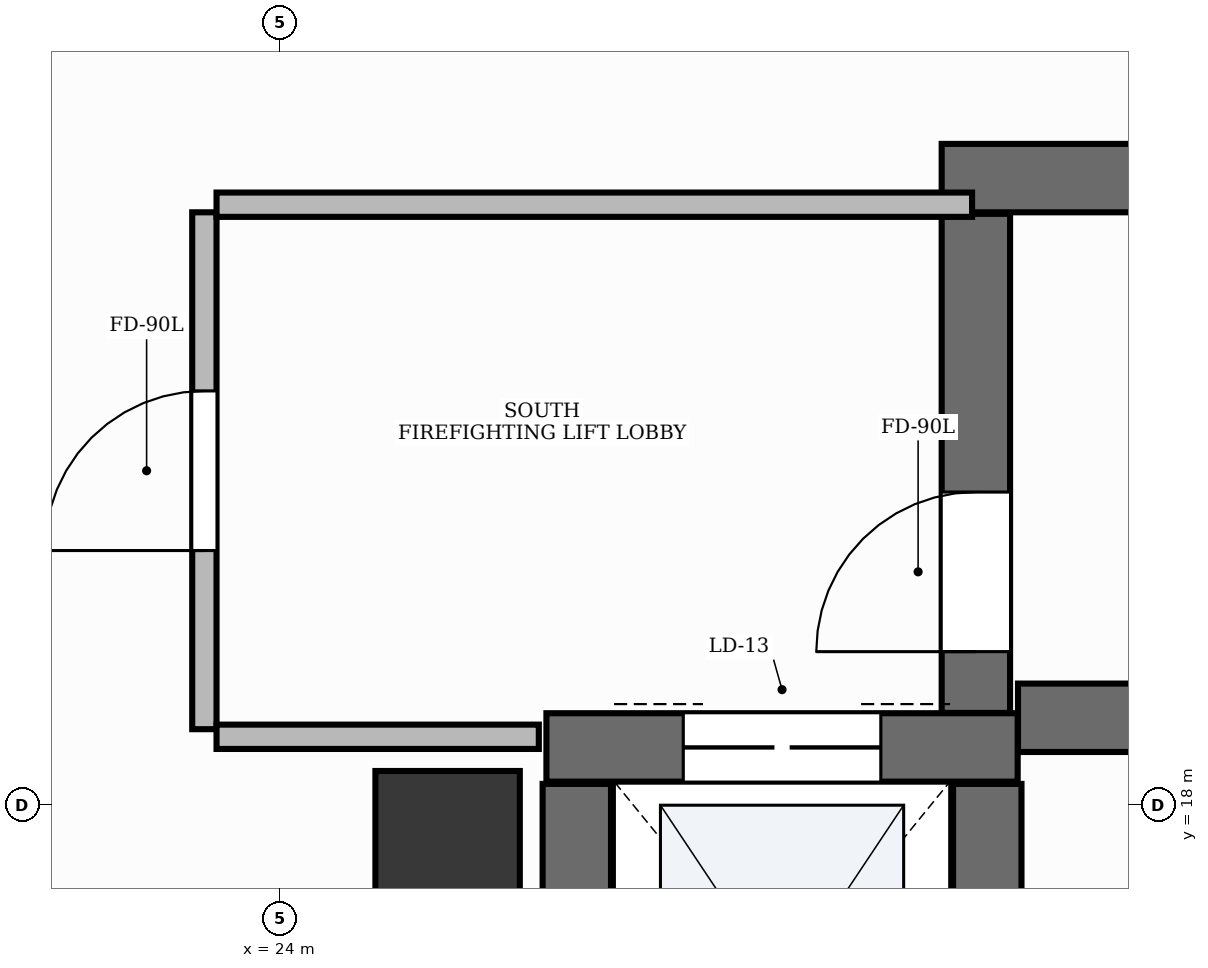
"""IFC4 building model, lengths in metres.
Left out: names, types, materials, properties, quantities, classifications, styles, units other than length and angle.
Written with IfcOpenShell. Run it as: python <this file> out.ifc"""

import sys

from ifc_helpers import new_model, si_unit, direction, frame, frame_2d, origin, origin_2d, place, context, subcontext, project, spatial, rectangle, extrude, element, fill, save


model = new_model("IFC4")
c1 = context("Model", 3, precision=1e-05, world=origin(), true_north=direction((0.0, 1.0)))
c2 = subcontext(c1, "Body", "Model", "MODEL_VIEW")
j1 = project(units=[si_unit("LENGTHUNIT", "METRE"), si_unit("PLANEANGLEUNIT", "RADIAN")], contexts=[c1])
p1 = place(None, origin())
s1 = spatial("IfcSite", under=j1, at=p1, CompositionType="ELEMENT")
p2 = place(p1, origin())
s2 = spatial("IfcBuilding", under=s1, at=p2, CompositionType="ELEMENT")
p3 = place(p2, frame((0.0, 0.0, 90.0)))
s3 = spatial("IfcBuildingStorey", under=s2, at=p3, CompositionType="ELEMENT", Elevation=90.0)
p4 = place(p3, frame((28.852, 18.575, 0.0), z_axis=(0.0, 0.0, 1.0), x_axis=(1.0, 0.0, 0.0)))
e1 = element("IfcWall", 1, at=p4, inside=s3, PredefinedType="SHEAR", context=c2, shape_type="SweptSolid", body=[
    extrude(rectangle(XDim=8.248, YDim=0.45, at=frame_2d((4.124, 0.0))), origin(), (0.0, 0.0, 1.0), 3.9),
])
p5 = place(p3, frame((28.35, 22.125, 0.0), z_axis=(0.0, 0.0, 1.0), x_axis=(1.0, 0.0, 0.0)))
e2 = element("IfcWall", 2, at=p5, inside=s3, PredefinedType="SHEAR", context=c2, shape_type="SweptSolid", body=[
    extrude(rectangle(XDim=8.75, YDim=0.45, at=frame_2d((4.375, 0.0))), origin(), (0.0, 0.0, 1.0), 3.9),
])
p6 = place(p3, frame((28.575, 18.607, 0.0), z_axis=(0.0, 0.0, 1.0), x_axis=(0.0, 1.0, 0.0)))
e3 = element("IfcWall", 3, at=p6, inside=s3, PredefinedType="SHEAR", context=c2, shape_type="SweptSolid", body=[
    extrude(rectangle(XDim=3.283, YDim=0.45, at=frame_2d((1.642, 0.0))), origin(), (0.0, 0.0, 1.0), 3.9),
])
p7 = place(p6, frame((0.403, 0.0, 0.0)))
e4 = element("IfcOpeningElement", 4, at=p7, cuts=e3, PredefinedType="OPENING", context=c2, shape_type="SweptSolid", body=[
    extrude(rectangle(XDim=1.05, YDim=2.15, at=frame_2d((0.525, 1.075))), frame((0.0, 0.24, 0.0), z_axis=(0.0, -1.0, 0.0), x_axis=(1.0, 0.0, 0.0)), (0.0, 0.0, 1.0), 0.48),
])
p8 = place(p3, frame((25.75, 18.38, 0.0), z_axis=(0.0, 0.0, 1.0), x_axis=(1.0, 0.0, 0.0)))
e5 = element("IfcWall", 5, at=p8, inside=s3, PredefinedType="SHEAR", context=c2, shape_type="SweptSolid", body=[
    extrude(rectangle(XDim=3.1, YDim=0.45, at=frame_2d((1.55, 0.0))), origin(), (0.0, 0.0, 1.0), 3.9),
])
p9 = place(p8, frame((0.9, 0.0, 0.0)))
e6 = element("IfcOpeningElement", 6, at=p9, cuts=e5, PredefinedType="OPENING", context=c2, shape_type="SweptSolid", body=[
    extrude(rectangle(XDim=1.3, YDim=2.2, at=frame_2d((0.65, 1.1))), frame((0.0, 0.24, 0.0), z_axis=(0.0, -1.0, 0.0), x_axis=(1.0, 0.0, 0.0)), (0.0, 0.0, 1.0), 0.48),
])
for number, where, z_axis, x_axis in (
    (7, (25.95, 15.44, 0.0), (0.0, 0.0, 1.0), (0.0, 1.0, 0.0)),
    (8, (28.65, 15.44, 0.0), (0.0, 0.0, 1.0), (0.0, 1.0, 0.0)),
):
    element("IfcWall", number, at=place(p3, frame(where, z_axis=z_axis, x_axis=x_axis)), inside=s3, PredefinedType="SHEAR", context=c2, shape_type="SweptSolid", body=[
        extrude(rectangle(XDim=2.7, YDim=0.45, at=frame_2d((1.35, 0.0))), origin(), (0.0, 0.0, 1.0), 3.9),
    ])
p10 = place(p3, frame((25.1, 17.75, -0.0), z_axis=(0.0, 0.0, 1.0), x_axis=(1.0, 0.0, 0.0)))
e9 = element("IfcColumn", 9, at=p10, inside=s3, PredefinedType="PILASTER", context=c2, shape_type="SweptSolid", body=[
    extrude(rectangle(XDim=0.95, YDim=0.95, at=origin_2d()), origin(), (0.0, 0.0, 1.0), 3.901),
])
p11 = place(p3, frame((23.5, 18.5, 0.0), z_axis=(0.0, 0.0, 1.0), x_axis=(0.0, 1.0, 0.0)))
e10 = element("IfcWall", 10, at=p11, inside=s3, PredefinedType="PARTITIONING", context=c2, shape_type="SweptSolid", body=[
    extrude(rectangle(XDim=3.4, YDim=0.16, at=frame_2d((1.7, 0.0))), origin(), (0.0, 0.0, 1.0), 2.91),
])
p12 = place(p11, frame((1.175, 0.0, 0.0)))
e11 = element("IfcOpeningElement", 11, at=p12, cuts=e10, PredefinedType="OPENING", context=c2, shape_type="SweptSolid", body=[
    extrude(rectangle(XDim=1.05, YDim=2.15, at=frame_2d((0.525, 1.075))), frame((0.0, 0.095, 0.0), z_axis=(0.0, -1.0, 0.0), x_axis=(1.0, 0.0, 0.0)), (0.0, 0.0, 1.0), 0.19),
])
p13 = place(p3, frame((23.58, 21.95, 0.0), z_axis=(0.0, 0.0, 1.0), x_axis=(1.0, 0.0, 0.0)))
e12 = element("IfcWall", 12, at=p13, inside=s3, PredefinedType="PARTITIONING", context=c2, shape_type="SweptSolid", body=[
    extrude(rectangle(XDim=4.97, YDim=0.16, at=frame_2d((2.485, 0.0))), origin(), (0.0, 0.0, 1.0), 2.91),
])
p14 = place(p3, frame((23.58, 18.45, 0.0), z_axis=(0.0, 0.0, 1.0), x_axis=(1.0, 0.0, 0.0)))
e13 = element("IfcWall", 13, at=p14, inside=s3, PredefinedType="PARTITIONING", context=c2, shape_type="SweptSolid", body=[
    extrude(rectangle(XDim=2.12, YDim=0.16, at=frame_2d((1.06, 0.0))), origin(), (0.0, 0.0, 1.0), 2.91),
])
p15 = place(p7, origin())
e14 = element("IfcDoor", 14, at=p15, inside=s3, OperationType="SINGLE_SWING_LEFT", PredefinedType="DOOR", context=c2, shape_type="SweptSolid", body=[
    extrude(rectangle(XDim=1.05, YDim=2.15, at=frame_2d((0.525, 1.075))), frame((0.0, 0.025, 0.0), z_axis=(0.0, -1.0, 0.0), x_axis=(1.0, 0.0, 0.0)), (0.0, 0.0, 1.0), 0.05),
])
fill(e4, e14)
p16 = place(p9, origin())
e15 = element("IfcDoor", 15, at=p16, inside=s3, OperationType="DOUBLE_DOOR_SLIDING", PredefinedType="DOOR", context=c2, shape_type="SweptSolid", body=[
    extrude(rectangle(XDim=1.3, YDim=2.2, at=frame_2d((0.65, 1.1))), frame((0.0, 0.025, 0.0), z_axis=(0.0, -1.0, 0.0), x_axis=(1.0, 0.0, 0.0)), (0.0, 0.0, 1.0), 0.05),
])
fill(e6, e15)
p17 = place(p12, origin())
e16 = element("IfcDoor", 16, at=p17, inside=s3, OperationType="SINGLE_SWING_LEFT", PredefinedType="DOOR", context=c2, shape_type="SweptSolid", body=[
    extrude(rectangle(XDim=1.05, YDim=2.15, at=frame_2d((0.525, 1.075))), frame((0.0, 0.025, 0.0), z_axis=(0.0, -1.0, 0.0), x_axis=(1.0, 0.0, 0.0)), (0.0, 0.0, 1.0), 0.05),
])
fill(e11, e16)
save(model, sys.argv[1])
